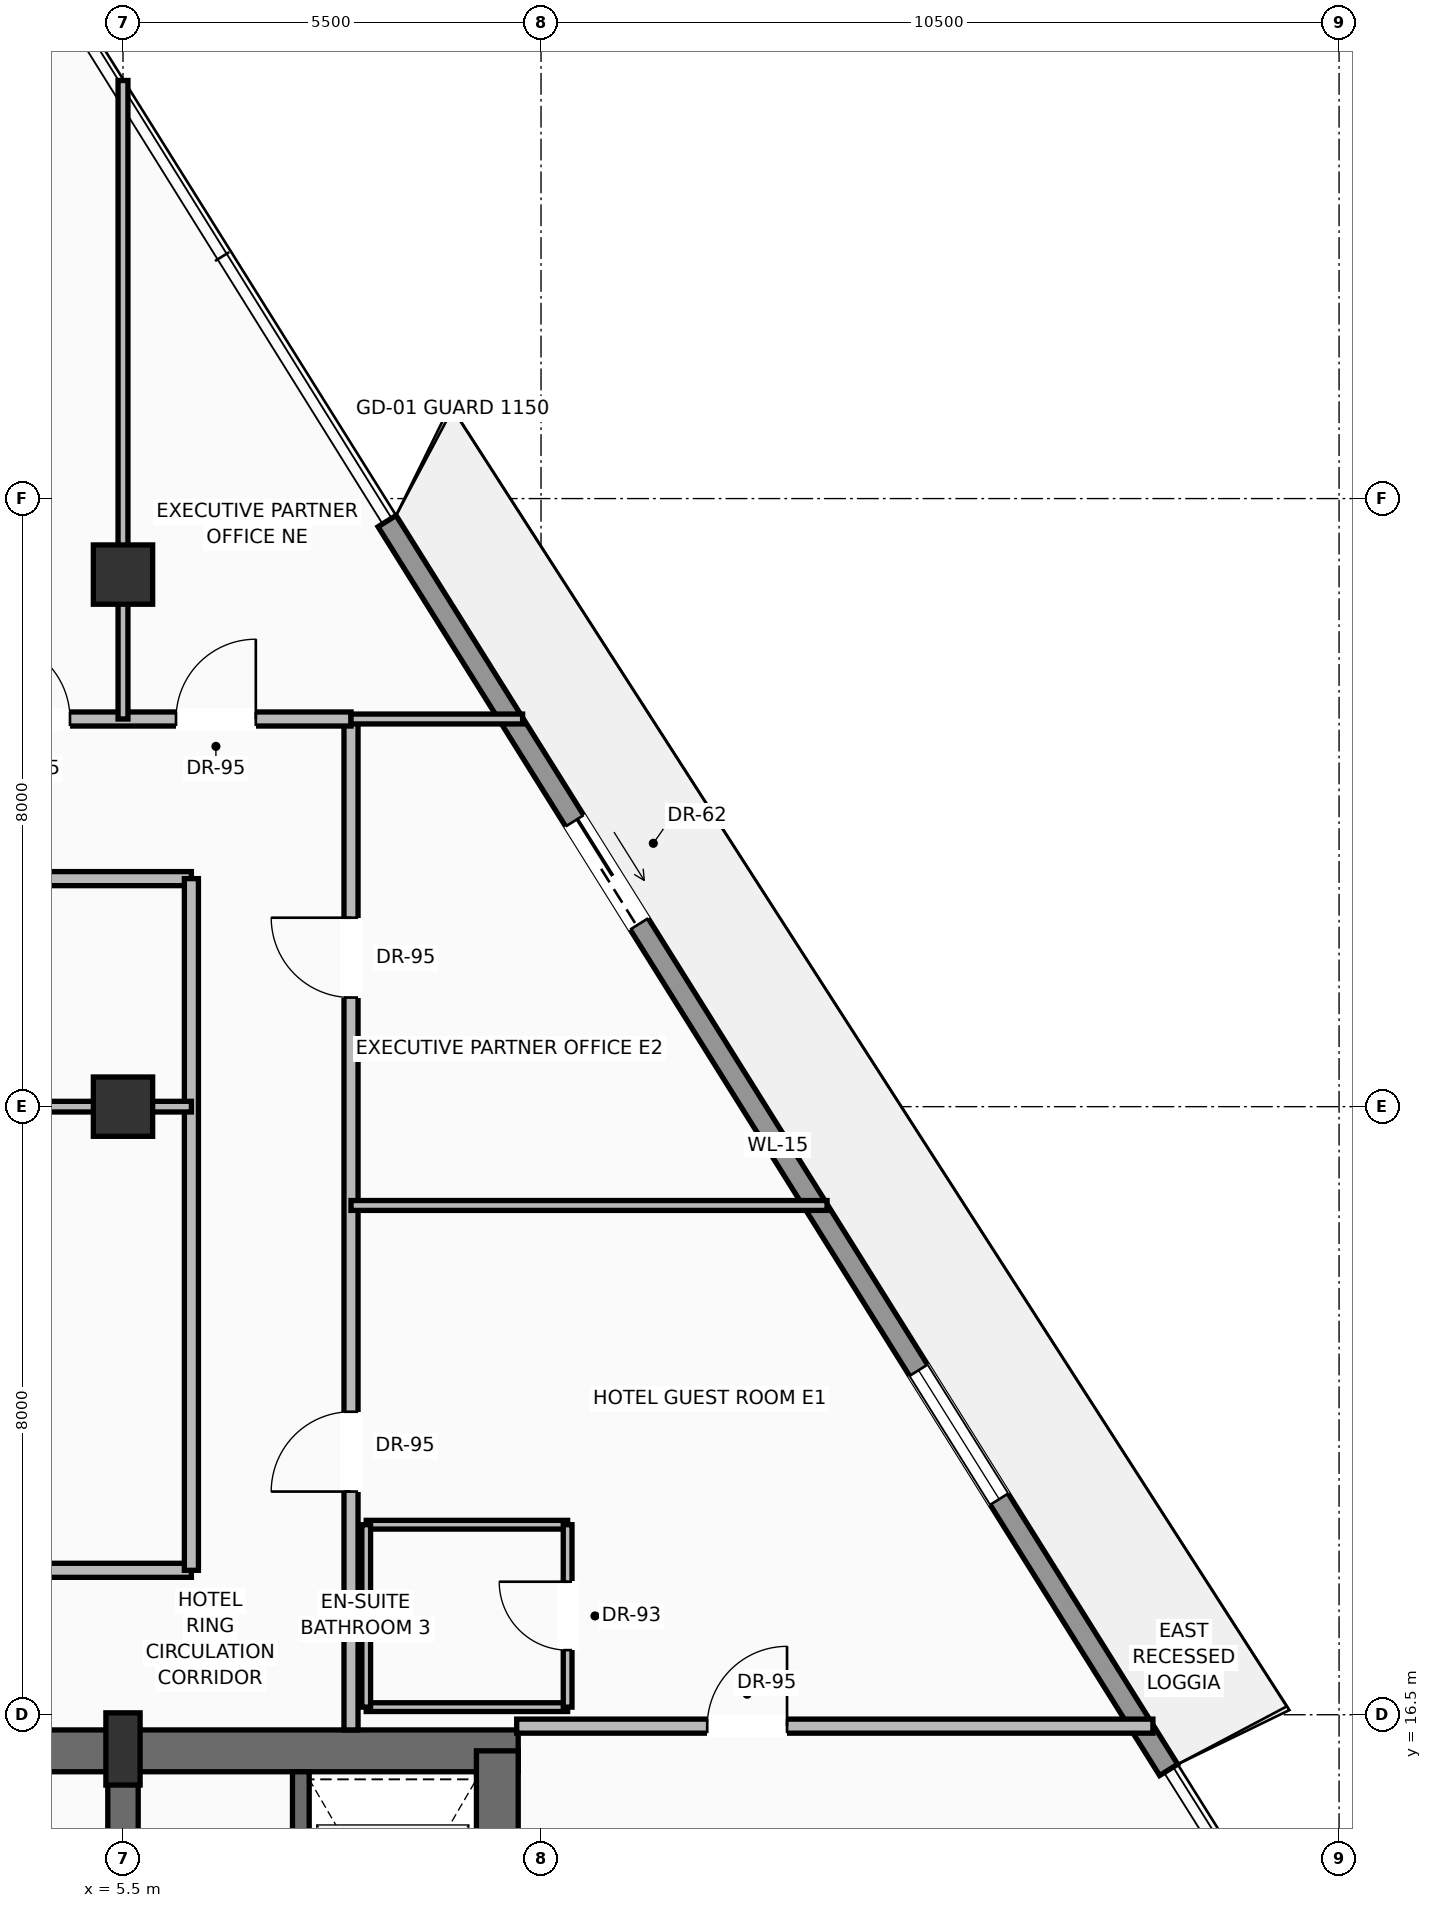
"""IFC4 building model, lengths in metres.
Left out: names, types, materials, properties, quantities, classifications, styles, units other than length and angle.
Written with IfcOpenShell. Run it as: python <this file> out.ifc"""

import sys

from ifc_helpers import new_model, si_unit, direction, frame, frame_2d, origin, origin_2d, place, context, subcontext, project, spatial, rectangle, extrude, source, transform, mapped, element, fill, save


model = new_model("IFC4")
c1 = context("Model", 3, precision=1e-05, world=origin(), true_north=direction((0.0, 1.0)))
c2 = subcontext(c1, "Body", "Model", "MODEL_VIEW")
j1 = project(units=[si_unit("LENGTHUNIT", "METRE"), si_unit("PLANEANGLEUNIT", "RADIAN")], contexts=[c1])
p1 = place(None, origin())
s1 = spatial("IfcSite", under=j1, at=p1, CompositionType="ELEMENT")
p2 = place(p1, origin())
s2 = spatial("IfcBuilding", under=s1, at=p2, CompositionType="ELEMENT")
p3 = place(p2, frame((0.0, 0.0, 220.0)))
s3 = spatial("IfcBuildingStorey", under=s2, at=p3, CompositionType="ELEMENT", Elevation=220.0)
p4 = place(p3, frame((-10.7, 16.025, 0.0), z_axis=(0.0, 0.0, 1.0), x_axis=(1.0, 0.0, 0.0)))
e1 = element("IfcWall", 1, at=p4, inside=s3, PredefinedType="SHEAR", context=c2, shape_type="SweptSolid", body=[
    extrude(rectangle(XDim=21.4, YDim=0.55, at=frame_2d((10.7, 0.0))), origin(), (0.0, 0.0, 1.0), 3.24),
])
p5 = place(p4, frame((3.27, 0.0, 0.0)))
e2 = element("IfcOpeningElement", 2, at=p5, cuts=e1, PredefinedType="OPENING", context=c2, shape_type="SweptSolid", body=[
    extrude(rectangle(XDim=1.3, YDim=2.3, at=frame_2d((0.65, 1.15))), frame((0.0, 0.285, 0.0), z_axis=(0.0, -1.0, 0.0), x_axis=(1.0, 0.0, 0.0)), (0.0, 0.0, 1.0), 0.57),
])
p6 = place(p4, frame((9.7, 0.0, 0.0)))
e3 = element("IfcOpeningElement", 3, at=p6, cuts=e1, PredefinedType="OPENING", context=c2, shape_type="SweptSolid", body=[
    extrude(rectangle(XDim=2.0, YDim=2.4, at=frame_2d((1.0, 1.2))), frame((0.0, 0.285, 0.0), z_axis=(0.0, -1.0, 0.0), x_axis=(1.0, 0.0, 0.0)), (0.0, 0.0, 1.0), 0.57),
])
p7 = place(p3, frame((10.425, 0.575, 0.0), z_axis=(0.0, 0.0, 1.0), x_axis=(0.0, 1.0, 0.0)))
e4 = element("IfcWall", 4, at=p7, inside=s3, PredefinedType="SHEAR", context=c2, shape_type="SweptSolid", body=[
    extrude(rectangle(XDim=15.45, YDim=0.55, at=frame_2d((7.725, 0.0))), origin(), (0.0, 0.0, 1.0), 3.24),
])
p8 = place(p3, frame((5.5, 0.575, 0.0), z_axis=(0.0, 0.0, 1.0), x_axis=(0.0, 1.0, 0.0)))
e5 = element("IfcWall", 5, at=p8, inside=s3, PredefinedType="SHEAR", context=c2, shape_type="SweptSolid", body=[
    extrude(rectangle(XDim=15.45, YDim=0.4, at=frame_2d((7.725, 0.0))), origin(), (0.0, 0.0, 1.0), 3.24),
])
p9 = place(p8, frame((8.925, 0.0, 0.0)))
e6 = element("IfcOpeningElement", 6, at=p9, cuts=e5, PredefinedType="OPENING", context=c2, shape_type="SweptSolid", body=[
    extrude(rectangle(XDim=1.1, YDim=2.2, at=frame_2d((0.55, 1.1))), frame((0.0, 0.21, 0.0), z_axis=(0.0, -1.0, 0.0), x_axis=(1.0, 0.0, 0.0)), (0.0, 0.0, 1.0), 0.42),
])
m1 = source(origin(), c2, "Body", "SweptSolid", [
    extrude(rectangle(XDim=0.45, YDim=0.95, at=origin_2d()), origin(), (0.0, 0.0, 1.0), 3.45),
])
p10 = place(p3, frame((5.5, 16.05, 0.0), z_axis=(0.0, 0.0, 1.0), x_axis=(1.0, 0.0, 0.0)))
e7 = element("IfcColumn", 7, at=p10, inside=s3, PredefinedType="PILASTER", context=c2, shape_type="MappedRepresentation", body=[
    mapped(m1, transform((0.0, 0.0, 0.0), scale=1.0)),
])
m2 = source(origin(), c2, "Body", "SweptSolid", [
    extrude(rectangle(XDim=0.78, YDim=0.78, at=origin_2d()), origin(), (0.0, 0.0, 1.0), 3.45),
])
for number, where, z_axis, x_axis in (
    (8, (5.5, 24.5, 0.0), (0.0, 0.0, 1.0), (1.0, 0.0, 0.0)),
    (9, (5.5, 31.5, 0.0), (0.0, 0.0, 1.0), (1.0, 0.0, 0.0)),
):
    element("IfcColumn", number, at=place(p3, frame(where, z_axis=z_axis, x_axis=x_axis)), inside=s3, PredefinedType="COLUMN", context=c2, shape_type="MappedRepresentation", body=[
        mapped(m2, transform((0.0, 0.0, 0.0), scale=1.0)),
    ])
p11 = place(p3, frame((8.975, 32.204, 0.0), z_axis=(0.0, 0.0, 1.0), x_axis=(0.530553627254, -0.847651372091, 0.0)))
e10 = element("IfcWall", 10, at=p11, inside=s3, PredefinedType="SOLIDWALL", context=c2, shape_type="SweptSolid", body=[
    extrude(rectangle(XDim=19.382, YDim=0.28, at=frame_2d((9.691, 0.0))), origin(), (0.0, 0.0, 1.0), 2.82),
])
p12 = place(p11, frame((4.652, 0.0, 0.0)))
e11 = element("IfcOpeningElement", 11, at=p12, cuts=e10, PredefinedType="OPENING", context=c2, shape_type="SweptSolid", body=[
    extrude(rectangle(XDim=1.6, YDim=2.35, at=frame_2d((0.8, 1.175))), frame((0.0, 0.15, 0.0), z_axis=(0.0, -1.0, 0.0), x_axis=(1.0, 0.0, 0.0)), (0.0, 0.0, 1.0), 0.3),
])
p13 = place(p11, frame((13.18, 0.0, 0.9)))
e12 = element("IfcOpeningElement", 12, at=p13, cuts=e10, PredefinedType="OPENING", context=c2, shape_type="SweptSolid", body=[
    extrude(rectangle(XDim=2.0, YDim=1.75, at=frame_2d((1.0, 0.875))), frame((0.0, 0.15, 0.0), z_axis=(0.0, -1.0, 0.0), x_axis=(1.0, 0.0, 0.0)), (0.0, 0.0, 1.0), 0.3),
])
p14 = place(p3, frame((7.84, 11.87, 0.0), z_axis=(0.0, 0.0, 1.0), x_axis=(0.0, 1.0, 0.0)))
e13 = element("IfcWall", 13, at=p14, inside=s3, PredefinedType="SOLIDWALL", context=c2, shape_type="SweptSolid", body=[
    extrude(rectangle(XDim=3.88, YDim=0.22, at=frame_2d((1.94, 0.0))), origin(), (0.0, 0.0, 1.0), 3.24),
])
p15 = place(p3, frame((-6.4, 18.4, 0.0), z_axis=(0.0, 0.0, 1.0), x_axis=(1.0, 0.0, 0.0)))
e14 = element("IfcWall", 14, at=p15, inside=s3, PredefinedType="PARTITIONING", context=c2, shape_type="SweptSolid", body=[
    extrude(rectangle(XDim=12.8, YDim=0.185, at=frame_2d((6.4, 0.0))), origin(), (0.0, 0.0, 1.0), 3.232),
])
p16 = place(p15, frame((5.925, 0.0, 0.0)))
e15 = element("IfcOpeningElement", 15, at=p16, cuts=e14, PredefinedType="OPENING", context=c2, shape_type="SweptSolid", body=[
    extrude(rectangle(XDim=0.95, YDim=2.2, at=frame_2d((0.475, 1.1))), frame((0.0, 0.103, 0.0), z_axis=(0.0, -1.0, 0.0), x_axis=(1.0, 0.0, 0.0)), (0.0, 0.0, 1.0), 0.205),
])
p17 = place(p3, frame((-6.4, 27.5, 0.0), z_axis=(0.0, 0.0, 1.0), x_axis=(1.0, 0.0, 0.0)))
e16 = element("IfcWall", 16, at=p17, inside=s3, PredefinedType="PARTITIONING", context=c2, shape_type="SweptSolid", body=[
    extrude(rectangle(XDim=12.8, YDim=0.185, at=frame_2d((6.4, 0.0))), origin(), (0.0, 0.0, 1.0), 3.232),
])
p18 = place(p17, frame((5.925, 0.0, 0.0)))
e17 = element("IfcOpeningElement", 17, at=p18, cuts=e16, PredefinedType="OPENING", context=c2, shape_type="SweptSolid", body=[
    extrude(rectangle(XDim=0.95, YDim=2.2, at=frame_2d((0.475, 1.1))), frame((0.0, 0.103, 0.0), z_axis=(0.0, -1.0, 0.0), x_axis=(1.0, 0.0, 0.0)), (0.0, 0.0, 1.0), 0.205),
])
p19 = place(p3, frame((6.4, 18.4, 0.0), z_axis=(0.0, 0.0, 1.0), x_axis=(0.0, 1.0, 0.0)))
e18 = element("IfcWall", 18, at=p19, inside=s3, PredefinedType="PARTITIONING", context=c2, shape_type="SweptSolid", body=[
    extrude(rectangle(XDim=9.1, YDim=0.185, at=frame_2d((4.55, 0.0))), origin(), (0.0, 0.0, 1.0), 3.232),
])
p20 = place(p3, frame((8.5, 16.3, 0.0), z_axis=(0.0, 0.0, 1.0), x_axis=(0.0, 1.0, 0.0)))
e19 = element("IfcWall", 19, at=p20, inside=s3, PredefinedType="PARTITIONING", context=c2, shape_type="SweptSolid", body=[
    extrude(rectangle(XDim=13.3, YDim=0.185, at=frame_2d((6.65, 0.0))), origin(), (0.0, 0.0, 1.0), 3.232),
])
p21 = place(p20, frame((3.136, 0.0, 0.0)))
e20 = element("IfcOpeningElement", 20, at=p21, cuts=e19, PredefinedType="OPENING", context=c2, shape_type="SweptSolid", body=[
    extrude(rectangle(XDim=1.05, YDim=2.25, at=frame_2d((0.525, 1.125))), frame((0.0, 0.103, 0.0), z_axis=(0.0, -1.0, 0.0), x_axis=(1.0, 0.0, 0.0)), (0.0, 0.0, 1.0), 0.205),
])
p22 = place(p20, frame((9.636, 0.0, 0.0)))
e21 = element("IfcOpeningElement", 21, at=p22, cuts=e19, PredefinedType="OPENING", context=c2, shape_type="SweptSolid", body=[
    extrude(rectangle(XDim=1.05, YDim=2.25, at=frame_2d((0.525, 1.125))), frame((0.0, 0.103, 0.0), z_axis=(0.0, -1.0, 0.0), x_axis=(1.0, 0.0, 0.0)), (0.0, 0.0, 1.0), 0.205),
])
p23 = place(p3, frame((-8.5, 29.6, 0.0), z_axis=(0.0, 0.0, 1.0), x_axis=(1.0, 0.0, 0.0)))
e22 = element("IfcWall", 22, at=p23, inside=s3, PredefinedType="PARTITIONING", context=c2, shape_type="SweptSolid", body=[
    extrude(rectangle(XDim=17.0, YDim=0.185, at=frame_2d((8.5, 0.0))), origin(), (0.0, 0.0, 1.0), 3.232),
])
p24 = place(p23, frame((3.698, 0.0, 0.0)))
e23 = element("IfcOpeningElement", 23, at=p24, cuts=e22, PredefinedType="OPENING", context=c2, shape_type="SweptSolid", body=[
    extrude(rectangle(XDim=1.05, YDim=2.25, at=frame_2d((0.525, 1.125))), frame((0.0, 0.103, 0.0), z_axis=(0.0, -1.0, 0.0), x_axis=(1.0, 0.0, 0.0)), (0.0, 0.0, 1.0), 0.205),
])
p25 = place(p23, frame((7.975, 0.0, 0.0)))
e24 = element("IfcOpeningElement", 24, at=p25, cuts=e22, PredefinedType="OPENING", context=c2, shape_type="SweptSolid", body=[
    extrude(rectangle(XDim=1.05, YDim=2.25, at=frame_2d((0.525, 1.125))), frame((0.0, 0.103, 0.0), z_axis=(0.0, -1.0, 0.0), x_axis=(1.0, 0.0, 0.0)), (0.0, 0.0, 1.0), 0.205),
])
p26 = place(p23, frame((12.252, 0.0, 0.0)))
e25 = element("IfcOpeningElement", 25, at=p26, cuts=e22, PredefinedType="OPENING", context=c2, shape_type="SweptSolid", body=[
    extrude(rectangle(XDim=1.05, YDim=2.25, at=frame_2d((0.525, 1.125))), frame((0.0, 0.103, 0.0), z_axis=(0.0, -1.0, 0.0), x_axis=(1.0, 0.0, 0.0)), (0.0, 0.0, 1.0), 0.205),
])
p27 = place(p23, frame((14.698, 0.0, 0.0)))
e26 = element("IfcOpeningElement", 26, at=p27, cuts=e22, PredefinedType="OPENING", context=c2, shape_type="SweptSolid", body=[
    extrude(rectangle(XDim=1.05, YDim=2.25, at=frame_2d((0.525, 1.125))), frame((0.0, 0.103, 0.0), z_axis=(0.0, -1.0, 0.0), x_axis=(1.0, 0.0, 0.0)), (0.0, 0.0, 1.0), 0.205),
])
p28 = place(p23, frame((1.252, 0.0, 0.0)))
e27 = element("IfcOpeningElement", 27, at=p28, cuts=e22, PredefinedType="OPENING", context=c2, shape_type="SweptSolid", body=[
    extrude(rectangle(XDim=1.05, YDim=2.25, at=frame_2d((0.525, 1.125))), frame((0.0, 0.103, 0.0), z_axis=(0.0, -1.0, 0.0), x_axis=(1.0, 0.0, 0.0)), (0.0, 0.0, 1.0), 0.205),
])
p29 = place(p3, frame((-6.4, 24.5, 0.0), z_axis=(0.0, 0.0, 1.0), x_axis=(1.0, 0.0, 0.0)))
e28 = element("IfcWall", 28, at=p29, inside=s3, PredefinedType="PARTITIONING", context=c2, shape_type="SweptSolid", body=[
    extrude(rectangle(XDim=12.8, YDim=0.14, at=frame_2d((6.4, 0.0))), origin(), (0.0, 0.0, 1.0), 2.683),
])
p30 = place(p3, frame((10.68, 16.35, 0.0), z_axis=(0.0, 0.0, 1.0), x_axis=(1.0, 0.0, 0.0)))
e29 = element("IfcWall", 29, at=p30, inside=s3, PredefinedType="PARTITIONING", context=c2, shape_type="SweptSolid", body=[
    extrude(rectangle(XDim=8.371, YDim=0.185, at=frame_2d((4.186, 0.0))), origin(), (0.0, 0.0, 1.0), 3.232),
])
p31 = place(p30, frame((2.507, 0.0, 0.0)))
e30 = element("IfcOpeningElement", 30, at=p31, cuts=e29, PredefinedType="OPENING", context=c2, shape_type="SweptSolid", body=[
    extrude(rectangle(XDim=1.05, YDim=2.25, at=frame_2d((0.525, 1.125))), frame((0.0, 0.103, 0.0), z_axis=(0.0, -1.0, 0.0), x_axis=(1.0, 0.0, 0.0)), (0.0, 0.0, 1.0), 0.205),
])
p32 = place(p3, frame((8.5, 29.6, 0.0), z_axis=(0.0, 0.0, 1.0), x_axis=(1.0, 0.0, 0.0)))
e31 = element("IfcWall", 31, at=p32, inside=s3, PredefinedType="PARTITIONING", context=c2, shape_type="SweptSolid", body=[
    extrude(rectangle(XDim=2.258, YDim=0.13, at=frame_2d((1.129, 0.0))), origin(), (0.0, 0.0, 1.0), 3.232),
])
p33 = place(p3, frame((5.5, 29.6, 0.0), z_axis=(0.0, 0.0, 1.0), x_axis=(0.0, 1.0, 0.0)))
e32 = element("IfcWall", 32, at=p33, inside=s3, PredefinedType="PARTITIONING", context=c2, shape_type="SweptSolid", body=[
    extrude(rectangle(XDim=8.4, YDim=0.13, at=frame_2d((4.2, 0.0))), origin(), (0.0, 0.0, 1.0), 2.683),
])
for number, where, z_axis, x_axis in (
    (33, (8.7, 16.6, 0.0), (0.0, 0.0, 1.0), (1.0, 0.0, 0.0)),
    (34, (8.7, 19.0, 0.0), (0.0, 0.0, 1.0), (1.0, 0.0, 0.0)),
):
    element("IfcWall", number, at=place(p3, frame(where, z_axis=z_axis, x_axis=x_axis)), inside=s3, PredefinedType="PARTITIONING", context=c2, shape_type="SweptSolid", body=[
        extrude(rectangle(XDim=2.65, YDim=0.115, at=frame_2d((1.325, 0.0))), origin(), (0.0, 0.0, 1.0), 3.232),
    ])
p34 = place(p3, frame((8.7, 16.6, 0.0), z_axis=(0.0, 0.0, 1.0), x_axis=(0.0, 1.0, 0.0)))
e35 = element("IfcWall", 35, at=p34, inside=s3, PredefinedType="PARTITIONING", context=c2, shape_type="SweptSolid", body=[
    extrude(rectangle(XDim=2.4, YDim=0.115, at=frame_2d((1.2, 0.0))), origin(), (0.0, 0.0, 1.0), 3.232),
])
p35 = place(p3, frame((11.35, 16.6, 0.0), z_axis=(0.0, 0.0, 1.0), x_axis=(0.0, 1.0, 0.0)))
e36 = element("IfcWall", 36, at=p35, inside=s3, PredefinedType="PARTITIONING", context=c2, shape_type="SweptSolid", body=[
    extrude(rectangle(XDim=2.4, YDim=0.115, at=frame_2d((1.2, 0.0))), origin(), (0.0, 0.0, 1.0), 3.232),
])
p36 = place(p35, frame((0.75, 0.0, 0.0)))
e37 = element("IfcOpeningElement", 37, at=p36, cuts=e36, PredefinedType="OPENING", context=c2, shape_type="SweptSolid", body=[
    extrude(rectangle(XDim=0.9, YDim=2.15, at=frame_2d((0.45, 1.075))), frame((0.0, 0.067, 0.0), z_axis=(0.0, -1.0, 0.0), x_axis=(1.0, 0.0, 0.0)), (0.0, 0.0, 1.0), 0.135),
])
p37 = place(p3, frame((8.5, 23.2, 0.0), z_axis=(0.0, 0.0, 1.0), x_axis=(1.0, 0.0, 0.0)))
e38 = element("IfcWall", 38, at=p37, inside=s3, PredefinedType="PARTITIONING", context=c2, shape_type="SweptSolid", body=[
    extrude(rectangle(XDim=6.263, YDim=0.13, at=frame_2d((3.132, 0.0))), origin(), (0.0, 0.0, 1.0), 3.232),
])
m3 = source(origin(), c2, "Body", "SweptSolid", [
    extrude(rectangle(XDim=1.6, YDim=2.35, at=frame_2d((0.8, 1.175))), frame((0.0, 0.025, 0.0), z_axis=(0.0, -1.0, 0.0), x_axis=(1.0, 0.0, 0.0)), (0.0, 0.0, 1.0), 0.05),
])
p38 = place(p12, origin())
e39 = element("IfcDoor", 39, at=p38, inside=s3, OperationType="SLIDING_TO_RIGHT", PredefinedType="DOOR", context=c2, shape_type="MappedRepresentation", body=[
    mapped(m3, transform((0.0, 0.0, 0.0), scale=1.0)),
])
fill(e11, e39)
m4 = source(origin(), c2, "Body", "SweptSolid", [
    extrude(rectangle(XDim=2.0, YDim=1.75, at=frame_2d((1.0, 0.875))), frame((0.0, 0.03, 0.0), z_axis=(0.0, -1.0, 0.0), x_axis=(1.0, 0.0, 0.0)), (0.0, 0.0, 1.0), 0.06),
])
p39 = place(p13, origin())
e40 = element("IfcWindow", 40, at=p39, inside=s3, PartitioningType="SINGLE_PANEL", PredefinedType="WINDOW", context=c2, shape_type="MappedRepresentation", body=[
    mapped(m4, transform((0.0, 0.0, 0.0), scale=1.0)),
])
fill(e12, e40)
m5 = source(origin(), c2, "Body", "SweptSolid", [
    extrude(rectangle(XDim=1.05, YDim=2.25, at=frame_2d((0.525, 1.125))), frame((0.0, 0.025, 0.0), z_axis=(0.0, -1.0, 0.0), x_axis=(1.0, 0.0, 0.0)), (0.0, 0.0, 1.0), 0.05),
])
p40 = place(p31, origin())
e41 = element("IfcDoor", 41, at=p40, inside=s3, OperationType="SINGLE_SWING_RIGHT", PredefinedType="DOOR", context=c2, shape_type="MappedRepresentation", body=[
    mapped(m5, transform((0.0, 0.0, 0.0), scale=1.0)),
])
fill(e30, e41)
m6 = source(origin(), c2, "Body", "SweptSolid", [
    extrude(rectangle(XDim=0.9, YDim=2.15, at=frame_2d((0.45, 1.075))), frame((0.0, 0.025, 0.0), z_axis=(0.0, -1.0, 0.0), x_axis=(1.0, 0.0, 0.0)), (0.0, 0.0, 1.0), 0.05),
])
p41 = place(p36, origin())
e42 = element("IfcDoor", 42, at=p41, inside=s3, OperationType="SINGLE_SWING_RIGHT", PredefinedType="DOOR", context=c2, shape_type="MappedRepresentation", body=[
    mapped(m6, transform((0.0, 0.0, 0.0), scale=1.0)),
])
fill(e37, e42)
p42 = place(p21, origin())
e43 = element("IfcDoor", 43, at=p42, inside=s3, OperationType="SINGLE_SWING_LEFT", PredefinedType="DOOR", context=c2, shape_type="MappedRepresentation", body=[
    mapped(m5, transform((0.0, 0.0, 0.0), scale=1.0)),
])
fill(e20, e43)
p43 = place(p22, origin())
e44 = element("IfcDoor", 44, at=p43, inside=s3, OperationType="SINGLE_SWING_RIGHT", PredefinedType="DOOR", context=c2, shape_type="MappedRepresentation", body=[
    mapped(m5, transform((0.0, 0.0, 0.0), scale=1.0)),
])
fill(e21, e44)
p44 = place(p26, origin())
e45 = element("IfcDoor", 45, at=p44, inside=s3, OperationType="SINGLE_SWING_LEFT", PredefinedType="DOOR", context=c2, shape_type="MappedRepresentation", body=[
    mapped(m5, transform((0.0, 0.0, 0.0), scale=1.0)),
])
fill(e25, e45)
p45 = place(p27, origin())
e46 = element("IfcDoor", 46, at=p45, inside=s3, OperationType="SINGLE_SWING_RIGHT", PredefinedType="DOOR", context=c2, shape_type="MappedRepresentation", body=[
    mapped(m5, transform((0.0, 0.0, 0.0), scale=1.0)),
])
fill(e26, e46)
save(model, sys.argv[1])
